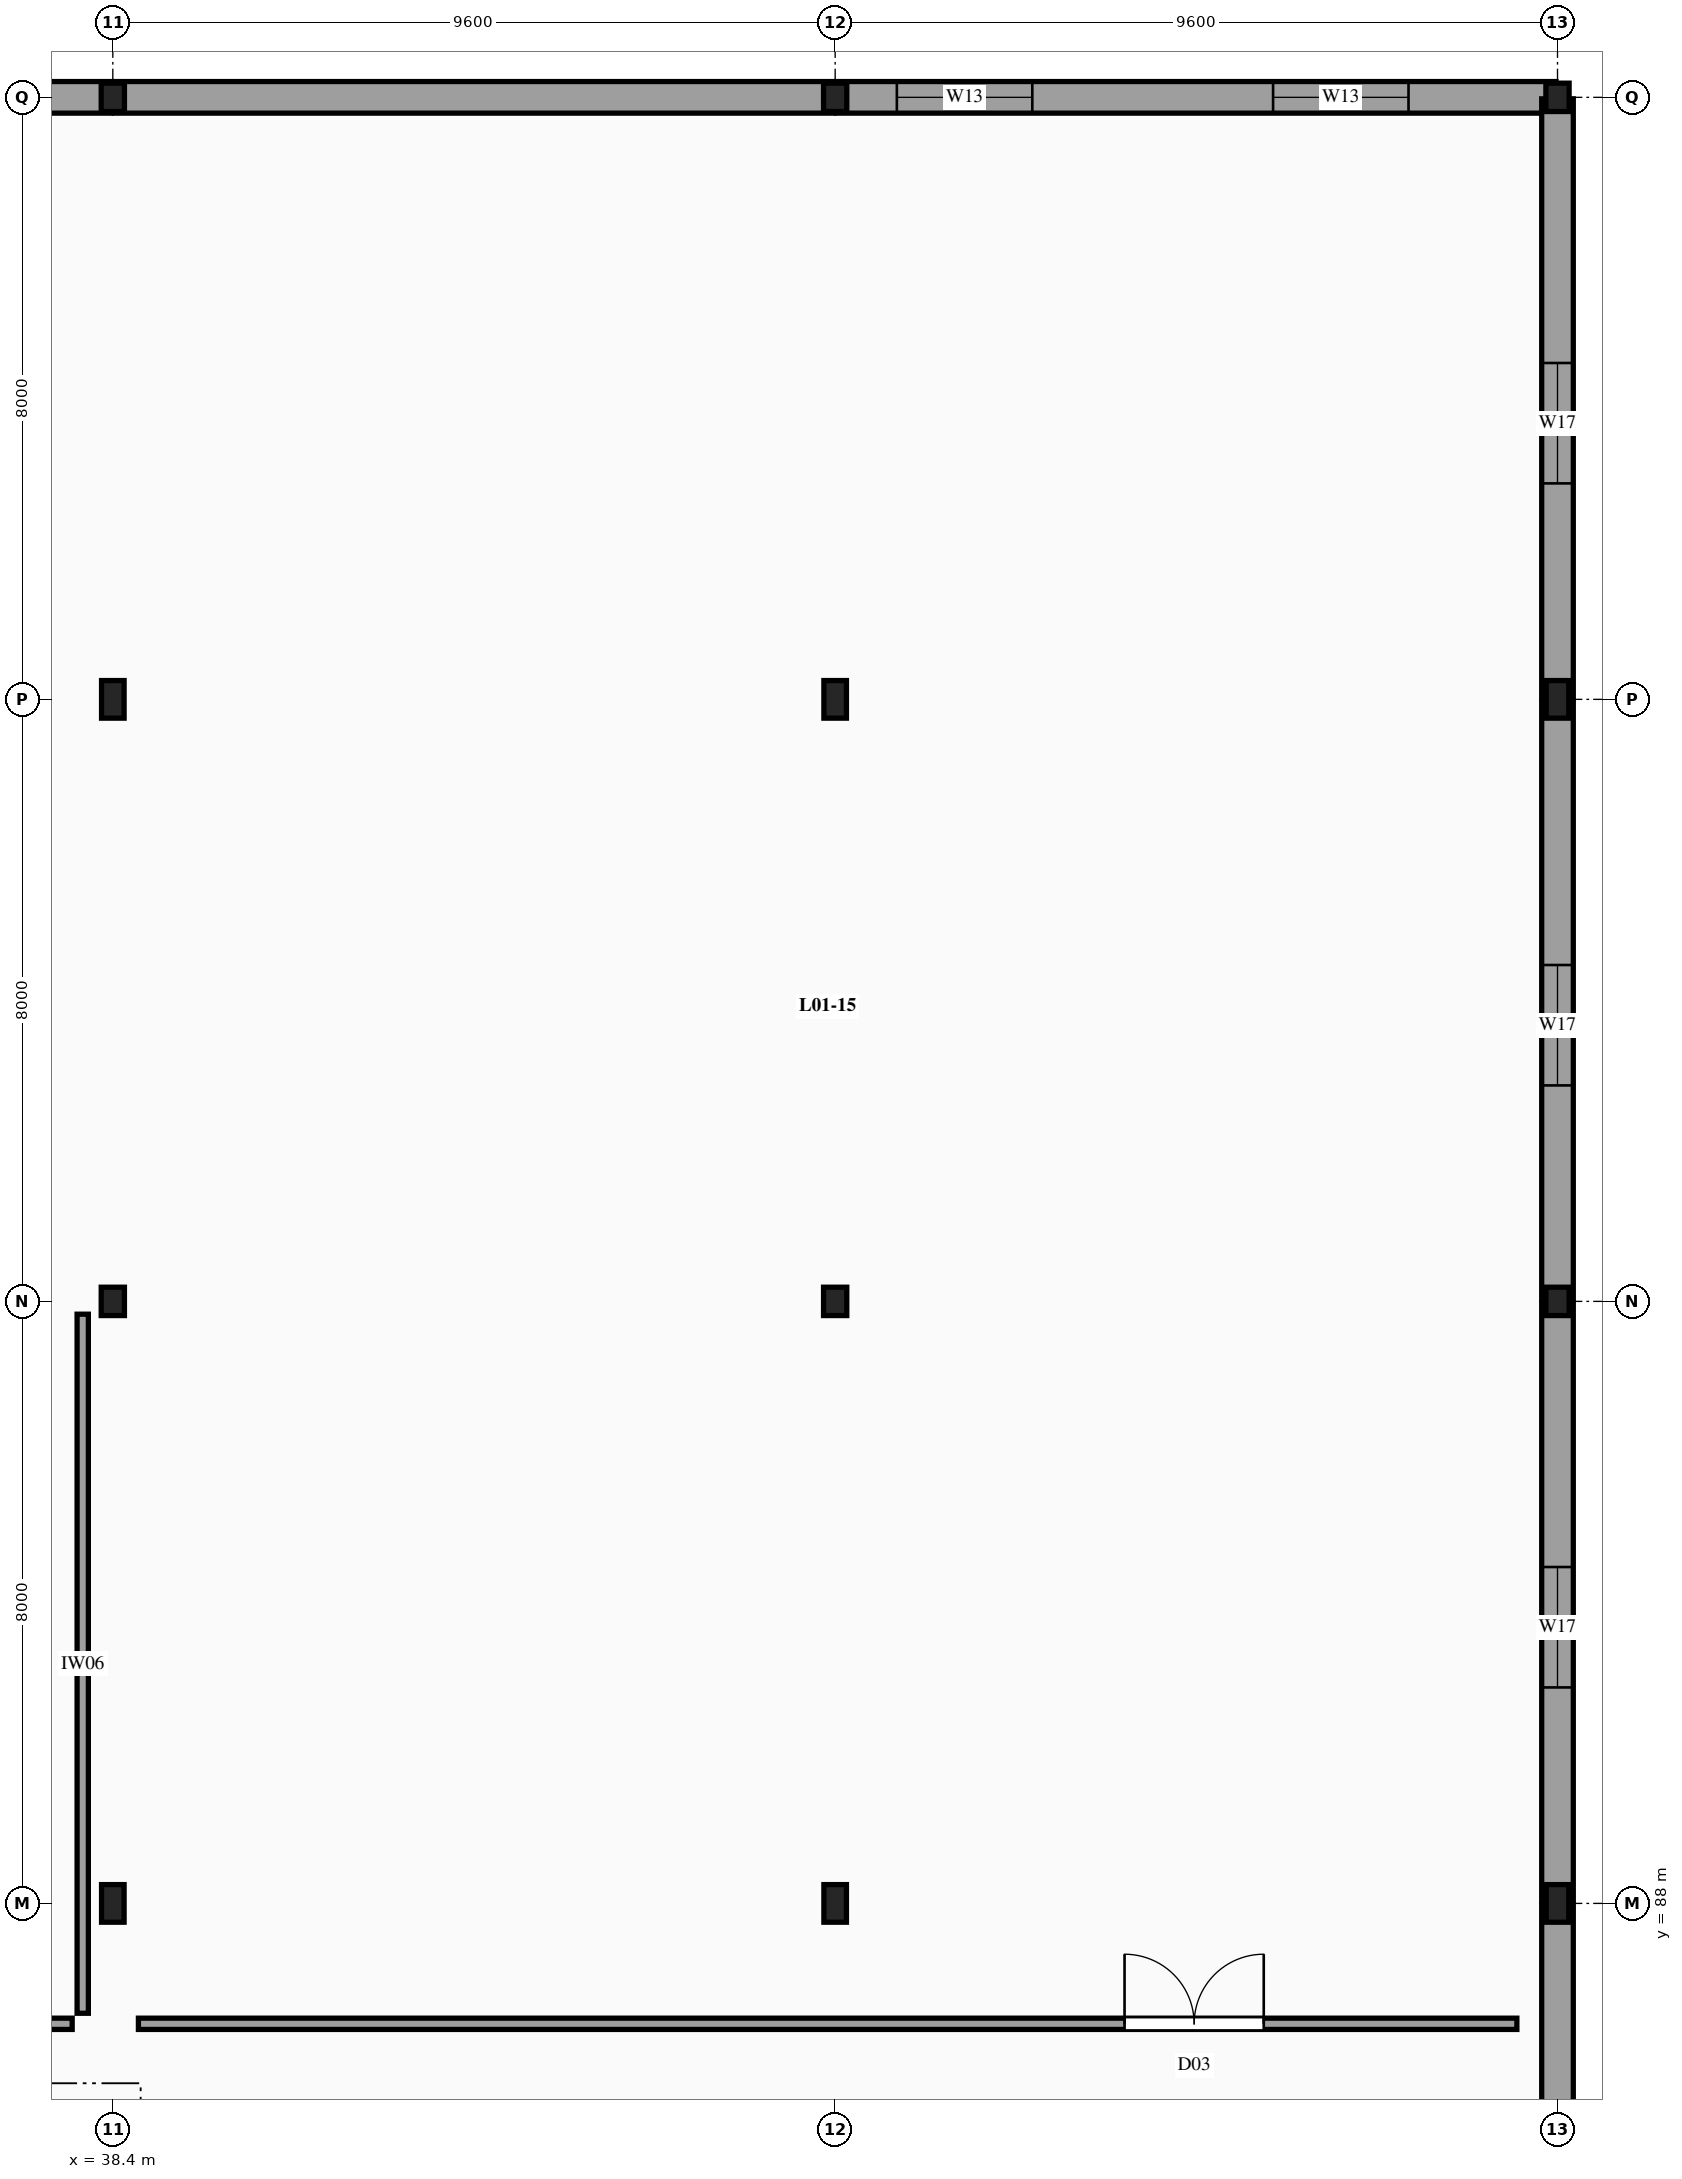
"""IFC4 building model, lengths in metres.
Left out: names, types, materials, properties, quantities, classifications, styles, units other than length and angle.
Written with IfcOpenShell. Run it as: python <this file> out.ifc"""

import sys

from ifc_helpers import new_model, si_unit, direction, frame, frame_2d, origin, origin_2d, place, context, subcontext, project, spatial, rectangle, i_section, extrude, element, fill, save


model = new_model("IFC4")
c1 = context("Model", 3, precision=1e-05, world=origin(), true_north=direction((0.0, 1.0)))
c2 = subcontext(c1, "Body", "Model", "MODEL_VIEW")
j1 = project(units=[si_unit("LENGTHUNIT", "METRE"), si_unit("PLANEANGLEUNIT", "RADIAN")], contexts=[c1])
p1 = place(None, origin())
s1 = spatial("IfcSite", under=j1, at=p1, CompositionType="ELEMENT")
p2 = place(p1, origin())
s2 = spatial("IfcBuilding", under=s1, at=p2, CompositionType="ELEMENT")
p3 = place(p2, frame((0.0, 0.0, 4.5)))
s3 = spatial("IfcBuildingStorey", under=s2, at=p3, CompositionType="ELEMENT", Elevation=4.5)
p4 = place(p3, frame((38.4, 88.0, -0.26), z_axis=(0.0, 0.0, 1.0), x_axis=(1.0, 0.0, 0.0)))
e1 = element("IfcColumn", 1, at=p4, inside=s3, PredefinedType="COLUMN", context=c2, shape_type="SweptSolid", body=[
    extrude(i_section(OverallWidth=0.3, OverallDepth=0.5, WebThickness=0.014, FlangeThickness=0.028, FilletRadius=0.027, at=origin_2d()), origin(), (0.0, 0.0, 1.0), 4.2),
])
p5 = place(p3, frame((38.4, 96.0, -0.26), z_axis=(0.0, 0.0, 1.0), x_axis=(1.0, 0.0, 0.0)))
e2 = element("IfcColumn", 2, at=p5, inside=s3, PredefinedType="COLUMN", context=c2, shape_type="SweptSolid", body=[
    extrude(i_section(OverallWidth=0.309, OverallDepth=0.377, WebThickness=0.021, FlangeThickness=0.04, FilletRadius=0.027, at=origin_2d()), origin(), (0.0, 0.0, 1.0), 4.2),
])
p6 = place(p3, frame((38.4, 104.0, -0.26), z_axis=(0.0, 0.0, 1.0), x_axis=(1.0, 0.0, 0.0)))
e3 = element("IfcColumn", 3, at=p6, inside=s3, PredefinedType="COLUMN", context=c2, shape_type="SweptSolid", body=[
    extrude(i_section(OverallWidth=0.3, OverallDepth=0.5, WebThickness=0.014, FlangeThickness=0.028, FilletRadius=0.027, at=origin_2d()), origin(), (0.0, 0.0, 1.0), 4.2),
])
p7 = place(p3, frame((38.4, 112.0, -0.26), z_axis=(0.0, 0.0, 1.0), x_axis=(1.0, 0.0, 0.0)))
e4 = element("IfcColumn", 4, at=p7, inside=s3, PredefinedType="COLUMN", context=c2, shape_type="SweptSolid", body=[
    extrude(i_section(OverallWidth=0.309, OverallDepth=0.377, WebThickness=0.021, FlangeThickness=0.04, FilletRadius=0.027, at=origin_2d()), origin(), (0.0, 0.0, 1.0), 4.2),
])
p8 = place(p3, frame((48.0, 88.0, -0.26), z_axis=(0.0, 0.0, 1.0), x_axis=(1.0, 0.0, 0.0)))
e5 = element("IfcColumn", 5, at=p8, inside=s3, PredefinedType="COLUMN", context=c2, shape_type="SweptSolid", body=[
    extrude(i_section(OverallWidth=0.3, OverallDepth=0.5, WebThickness=0.014, FlangeThickness=0.028, FilletRadius=0.027, at=origin_2d()), origin(), (0.0, 0.0, 1.0), 4.2),
])
p9 = place(p3, frame((48.0, 96.0, -0.26), z_axis=(0.0, 0.0, 1.0), x_axis=(1.0, 0.0, 0.0)))
e6 = element("IfcColumn", 6, at=p9, inside=s3, PredefinedType="COLUMN", context=c2, shape_type="SweptSolid", body=[
    extrude(i_section(OverallWidth=0.309, OverallDepth=0.377, WebThickness=0.021, FlangeThickness=0.04, FilletRadius=0.027, at=origin_2d()), origin(), (0.0, 0.0, 1.0), 4.2),
])
p10 = place(p3, frame((48.0, 104.0, -0.26), z_axis=(0.0, 0.0, 1.0), x_axis=(1.0, 0.0, 0.0)))
e7 = element("IfcColumn", 7, at=p10, inside=s3, PredefinedType="COLUMN", context=c2, shape_type="SweptSolid", body=[
    extrude(i_section(OverallWidth=0.3, OverallDepth=0.5, WebThickness=0.014, FlangeThickness=0.028, FilletRadius=0.027, at=origin_2d()), origin(), (0.0, 0.0, 1.0), 4.2),
])
p11 = place(p3, frame((48.0, 112.0, -0.26), z_axis=(0.0, 0.0, 1.0), x_axis=(1.0, 0.0, 0.0)))
e8 = element("IfcColumn", 8, at=p11, inside=s3, PredefinedType="COLUMN", context=c2, shape_type="SweptSolid", body=[
    extrude(i_section(OverallWidth=0.309, OverallDepth=0.377, WebThickness=0.021, FlangeThickness=0.04, FilletRadius=0.027, at=origin_2d()), origin(), (0.0, 0.0, 1.0), 4.2),
])
p12 = place(p3, frame((57.6, 88.0, -0.26), z_axis=(0.0, 0.0, 1.0), x_axis=(1.0, 0.0, 0.0)))
e9 = element("IfcColumn", 9, at=p12, inside=s3, PredefinedType="COLUMN", context=c2, shape_type="SweptSolid", body=[
    extrude(i_section(OverallWidth=0.3, OverallDepth=0.5, WebThickness=0.014, FlangeThickness=0.028, FilletRadius=0.027, at=origin_2d()), origin(), (0.0, 0.0, 1.0), 4.2),
])
p13 = place(p3, frame((57.6, 96.0, -0.26), z_axis=(0.0, 0.0, 1.0), x_axis=(1.0, 0.0, 0.0)))
e10 = element("IfcColumn", 10, at=p13, inside=s3, PredefinedType="COLUMN", context=c2, shape_type="SweptSolid", body=[
    extrude(i_section(OverallWidth=0.309, OverallDepth=0.377, WebThickness=0.021, FlangeThickness=0.04, FilletRadius=0.027, at=origin_2d()), origin(), (0.0, 0.0, 1.0), 4.2),
])
p14 = place(p3, frame((57.6, 104.0, -0.26), z_axis=(0.0, 0.0, 1.0), x_axis=(1.0, 0.0, 0.0)))
e11 = element("IfcColumn", 11, at=p14, inside=s3, PredefinedType="COLUMN", context=c2, shape_type="SweptSolid", body=[
    extrude(i_section(OverallWidth=0.3, OverallDepth=0.5, WebThickness=0.014, FlangeThickness=0.028, FilletRadius=0.027, at=origin_2d()), origin(), (0.0, 0.0, 1.0), 4.2),
])
p15 = place(p3, frame((57.6, 112.0, -0.26), z_axis=(0.0, 0.0, 1.0), x_axis=(1.0, 0.0, 0.0)))
e12 = element("IfcColumn", 12, at=p15, inside=s3, PredefinedType="COLUMN", context=c2, shape_type="SweptSolid", body=[
    extrude(i_section(OverallWidth=0.309, OverallDepth=0.377, WebThickness=0.021, FlangeThickness=0.04, FilletRadius=0.027, at=origin_2d()), origin(), (0.0, 0.0, 1.0), 4.2),
])
p16 = place(p3, frame((28.82, 112.0, 0.0), z_axis=(0.0, 0.0, 1.0), x_axis=(1.0, 0.0, 0.0)))
e13 = element("IfcWall", 13, at=p16, inside=s3, PredefinedType="SOLIDWALL", context=c2, shape_type="SweptSolid", body=[
    extrude(rectangle(XDim=9.56, YDim=0.42, at=frame_2d((4.78, 0.0))), origin(), (0.0, 0.0, 1.0), 3.26),
])
p17 = place(p16, frame((0.8, 0.0, 0.72)))
e14 = element("IfcOpeningElement", 14, at=p17, cuts=e13, PredefinedType="OPENING", context=c2, shape_type="SweptSolid", body=[
    extrude(rectangle(XDim=1.8, YDim=1.6, at=frame_2d((0.9, 0.8))), frame((0.0, 0.22, 0.0), z_axis=(0.0, -1.0, 0.0), x_axis=(1.0, 0.0, 0.0)), (0.0, 0.0, 1.0), 0.44),
])
p18 = place(p16, frame((5.8, 0.0, 0.72)))
e15 = element("IfcOpeningElement", 15, at=p18, cuts=e13, PredefinedType="OPENING", context=c2, shape_type="SweptSolid", body=[
    extrude(rectangle(XDim=1.8, YDim=1.6, at=frame_2d((0.9, 0.8))), frame((0.0, 0.22, 0.0), z_axis=(0.0, -1.0, 0.0), x_axis=(1.0, 0.0, 0.0)), (0.0, 0.0, 1.0), 0.44),
])
p19 = place(p3, frame((38.42, 112.0, 0.0), z_axis=(0.0, 0.0, 1.0), x_axis=(1.0, 0.0, 0.0)))
e16 = element("IfcWall", 16, at=p19, inside=s3, PredefinedType="SOLIDWALL", context=c2, shape_type="SweptSolid", body=[
    extrude(rectangle(XDim=9.56, YDim=0.42, at=frame_2d((4.78, 0.0))), origin(), (0.0, 0.0, 1.0), 3.26),
])
p20 = place(p3, frame((48.02, 112.0, 0.0), z_axis=(0.0, 0.0, 1.0), x_axis=(1.0, 0.0, 0.0)))
e17 = element("IfcWall", 17, at=p20, inside=s3, PredefinedType="SOLIDWALL", context=c2, shape_type="SweptSolid", body=[
    extrude(rectangle(XDim=9.56, YDim=0.42, at=frame_2d((4.78, 0.0))), origin(), (0.0, 0.0, 1.0), 3.26),
])
p21 = place(p20, frame((0.8, 0.0, 0.72)))
e18 = element("IfcOpeningElement", 18, at=p21, cuts=e17, PredefinedType="OPENING", context=c2, shape_type="SweptSolid", body=[
    extrude(rectangle(XDim=1.8, YDim=1.6, at=frame_2d((0.9, 0.8))), frame((0.0, 0.22, 0.0), z_axis=(0.0, -1.0, 0.0), x_axis=(1.0, 0.0, 0.0)), (0.0, 0.0, 1.0), 0.44),
])
p22 = place(p20, frame((5.8, 0.0, 0.72)))
e19 = element("IfcOpeningElement", 19, at=p22, cuts=e17, PredefinedType="OPENING", context=c2, shape_type="SweptSolid", body=[
    extrude(rectangle(XDim=1.8, YDim=1.6, at=frame_2d((0.9, 0.8))), frame((0.0, 0.22, 0.0), z_axis=(0.0, -1.0, 0.0), x_axis=(1.0, 0.0, 0.0)), (0.0, 0.0, 1.0), 0.44),
])
p23 = place(p3, frame((57.6, 80.02, 0.0), z_axis=(0.0, 0.0, 1.0), x_axis=(0.0, 1.0, 0.0)))
e20 = element("IfcWall", 20, at=p23, inside=s3, PredefinedType="SOLIDWALL", context=c2, shape_type="SweptSolid", body=[
    extrude(rectangle(XDim=7.96, YDim=0.42, at=frame_2d((3.98, 0.0))), origin(), (0.0, 0.0, 1.0), 3.26),
])
p24 = place(p23, frame((2.85, 0.0, 0.9)))
e21 = element("IfcOpeningElement", 21, at=p24, cuts=e20, PredefinedType="OPENING", context=c2, shape_type="SweptSolid", body=[
    extrude(rectangle(XDim=1.6, YDim=2.0, at=frame_2d((0.8, 1.0))), frame((0.0, 0.22, 0.0), z_axis=(0.0, -1.0, 0.0), x_axis=(1.0, 0.0, 0.0)), (0.0, 0.0, 1.0), 0.44),
])
p25 = place(p3, frame((57.6, 88.02, 0.0), z_axis=(0.0, 0.0, 1.0), x_axis=(0.0, 1.0, 0.0)))
e22 = element("IfcWall", 22, at=p25, inside=s3, PredefinedType="SOLIDWALL", context=c2, shape_type="SweptSolid", body=[
    extrude(rectangle(XDim=7.96, YDim=0.42, at=frame_2d((3.98, 0.0))), origin(), (0.0, 0.0, 1.0), 3.26),
])
p26 = place(p25, frame((2.85, 0.0, 0.9)))
e23 = element("IfcOpeningElement", 23, at=p26, cuts=e22, PredefinedType="OPENING", context=c2, shape_type="SweptSolid", body=[
    extrude(rectangle(XDim=1.6, YDim=2.0, at=frame_2d((0.8, 1.0))), frame((0.0, 0.22, 0.0), z_axis=(0.0, -1.0, 0.0), x_axis=(1.0, 0.0, 0.0)), (0.0, 0.0, 1.0), 0.44),
])
p27 = place(p3, frame((57.6, 96.02, 0.0), z_axis=(0.0, 0.0, 1.0), x_axis=(0.0, 1.0, 0.0)))
e24 = element("IfcWall", 24, at=p27, inside=s3, PredefinedType="SOLIDWALL", context=c2, shape_type="SweptSolid", body=[
    extrude(rectangle(XDim=7.96, YDim=0.42, at=frame_2d((3.98, 0.0))), origin(), (0.0, 0.0, 1.0), 3.26),
])
p28 = place(p27, frame((2.85, 0.0, 0.9)))
e25 = element("IfcOpeningElement", 25, at=p28, cuts=e24, PredefinedType="OPENING", context=c2, shape_type="SweptSolid", body=[
    extrude(rectangle(XDim=1.6, YDim=2.0, at=frame_2d((0.8, 1.0))), frame((0.0, 0.22, 0.0), z_axis=(0.0, -1.0, 0.0), x_axis=(1.0, 0.0, 0.0)), (0.0, 0.0, 1.0), 0.44),
])
p29 = place(p3, frame((57.6, 104.02, 0.0), z_axis=(0.0, 0.0, 1.0), x_axis=(0.0, 1.0, 0.0)))
e26 = element("IfcWall", 26, at=p29, inside=s3, PredefinedType="SOLIDWALL", context=c2, shape_type="SweptSolid", body=[
    extrude(rectangle(XDim=7.96, YDim=0.42, at=frame_2d((3.98, 0.0))), origin(), (0.0, 0.0, 1.0), 3.26),
])
p30 = place(p29, frame((2.85, 0.0, 0.9)))
e27 = element("IfcOpeningElement", 27, at=p30, cuts=e26, PredefinedType="OPENING", context=c2, shape_type="SweptSolid", body=[
    extrude(rectangle(XDim=1.6, YDim=2.0, at=frame_2d((0.8, 1.0))), frame((0.0, 0.22, 0.0), z_axis=(0.0, -1.0, 0.0), x_axis=(1.0, 0.0, 0.0)), (0.0, 0.0, 1.0), 0.44),
])
p31 = place(p3, frame((10.14, 86.4, 0.0), z_axis=(0.0, 0.0, 1.0), x_axis=(1.0, 0.0, 0.0)))
e28 = element("IfcWall", 28, at=p31, inside=s3, PredefinedType="PARTITIONING", context=c2, shape_type="SweptSolid", body=[
    extrude(rectangle(XDim=27.72, YDim=0.15, at=frame_2d((13.86, 0.0))), origin(), (0.0, 0.0, 1.0), 3.1),
])
p32 = place(p31, frame((22.378, 0.0, 0.0)))
e29 = element("IfcOpeningElement", 29, at=p32, cuts=e28, PredefinedType="OPENING", context=c2, shape_type="SweptSolid", body=[
    extrude(rectangle(XDim=2.0, YDim=2.6, at=frame_2d((1.0, 1.3))), frame((0.0, 0.085, 0.0), z_axis=(0.0, -1.0, 0.0), x_axis=(1.0, 0.0, 0.0)), (0.0, 0.0, 1.0), 0.17),
])
p33 = place(p3, frame((38.0, 86.54, 0.0), z_axis=(0.0, 0.0, 1.0), x_axis=(0.0, 1.0, 0.0)))
e30 = element("IfcWall", 30, at=p33, inside=s3, PredefinedType="PARTITIONING", context=c2, shape_type="SweptSolid", body=[
    extrude(rectangle(XDim=9.29, YDim=0.15, at=frame_2d((4.645, 0.0))), origin(), (0.0, 0.0, 1.0), 3.1),
])
p34 = place(p3, frame((38.74, 86.4, 0.0), z_axis=(0.0, 0.0, 1.0), x_axis=(1.0, 0.0, 0.0)))
e31 = element("IfcWall", 31, at=p34, inside=s3, PredefinedType="PARTITIONING", context=c2, shape_type="SweptSolid", body=[
    extrude(rectangle(XDim=18.32, YDim=0.15, at=frame_2d((9.16, 0.0))), origin(), (0.0, 0.0, 1.0), 3.1),
])
p35 = place(p34, frame((13.106, 0.0, 0.0)))
e32 = element("IfcOpeningElement", 32, at=p35, cuts=e31, PredefinedType="OPENING", context=c2, shape_type="SweptSolid", body=[
    extrude(rectangle(XDim=1.85, YDim=2.5, at=frame_2d((0.925, 1.25))), frame((0.0, 0.085, 0.0), z_axis=(0.0, -1.0, 0.0), x_axis=(1.0, 0.0, 0.0)), (0.0, 0.0, 1.0), 0.17),
])
p36 = place(p21, origin())
e33 = element("IfcWindow", 33, at=p36, inside=s3, PartitioningType="SINGLE_PANEL", PredefinedType="WINDOW", context=c2, shape_type="SweptSolid", body=[
    extrude(rectangle(XDim=1.8, YDim=1.6, at=frame_2d((0.9, 0.8))), frame((0.0, 0.03, 0.0), z_axis=(0.0, -1.0, 0.0), x_axis=(1.0, 0.0, 0.0)), (0.0, 0.0, 1.0), 0.06),
])
fill(e18, e33)
p37 = place(p22, origin())
e34 = element("IfcWindow", 34, at=p37, inside=s3, PartitioningType="SINGLE_PANEL", PredefinedType="WINDOW", context=c2, shape_type="SweptSolid", body=[
    extrude(rectangle(XDim=1.8, YDim=1.6, at=frame_2d((0.9, 0.8))), frame((0.0, 0.03, 0.0), z_axis=(0.0, -1.0, 0.0), x_axis=(1.0, 0.0, 0.0)), (0.0, 0.0, 1.0), 0.06),
])
fill(e19, e34)
p38 = place(p26, origin())
e35 = element("IfcWindow", 35, at=p38, inside=s3, PartitioningType="SINGLE_PANEL", PredefinedType="WINDOW", context=c2, shape_type="SweptSolid", body=[
    extrude(rectangle(XDim=1.6, YDim=2.0, at=frame_2d((0.8, 1.0))), frame((0.0, 0.03, 0.0), z_axis=(0.0, -1.0, 0.0), x_axis=(1.0, 0.0, 0.0)), (0.0, 0.0, 1.0), 0.06),
])
fill(e23, e35)
p39 = place(p28, origin())
e36 = element("IfcWindow", 36, at=p39, inside=s3, PartitioningType="SINGLE_PANEL", PredefinedType="WINDOW", context=c2, shape_type="SweptSolid", body=[
    extrude(rectangle(XDim=1.6, YDim=2.0, at=frame_2d((0.8, 1.0))), frame((0.0, 0.03, 0.0), z_axis=(0.0, -1.0, 0.0), x_axis=(1.0, 0.0, 0.0)), (0.0, 0.0, 1.0), 0.06),
])
fill(e25, e36)
p40 = place(p30, origin())
e37 = element("IfcWindow", 37, at=p40, inside=s3, PartitioningType="SINGLE_PANEL", PredefinedType="WINDOW", context=c2, shape_type="SweptSolid", body=[
    extrude(rectangle(XDim=1.6, YDim=2.0, at=frame_2d((0.8, 1.0))), frame((0.0, 0.03, 0.0), z_axis=(0.0, -1.0, 0.0), x_axis=(1.0, 0.0, 0.0)), (0.0, 0.0, 1.0), 0.06),
])
fill(e27, e37)
p41 = place(p35, origin())
e38 = element("IfcDoor", 38, at=p41, inside=s3, OperationType="DOUBLE_DOOR_SINGLE_SWING", PredefinedType="DOOR", context=c2, shape_type="SweptSolid", body=[
    extrude(rectangle(XDim=1.85, YDim=2.5, at=frame_2d((0.925, 1.25))), frame((0.0, 0.025, 0.0), z_axis=(0.0, -1.0, 0.0), x_axis=(1.0, 0.0, 0.0)), (0.0, 0.0, 1.0), 0.05),
])
fill(e32, e38)
save(model, sys.argv[1])
